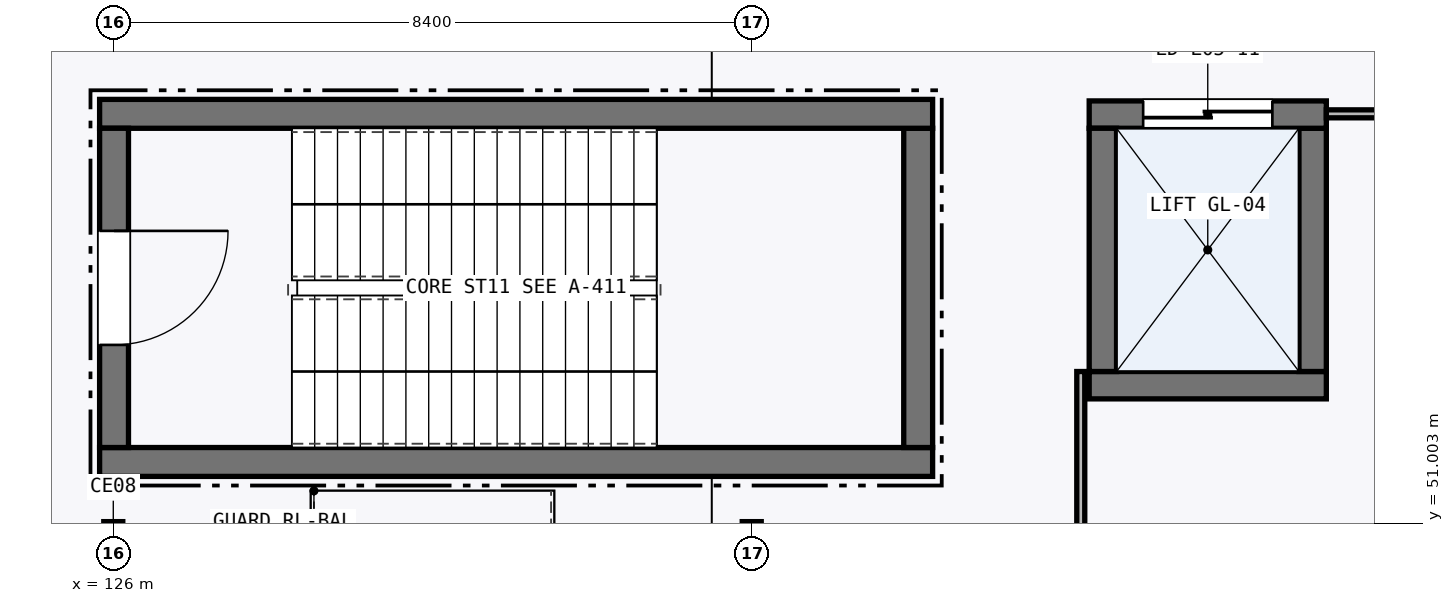
"""IFC4 building model, lengths in metres.
Left out: names, types, materials, properties, quantities, classifications, styles, units other than length and angle.
Written with IfcOpenShell. Run it as: python <this file> out.ifc"""

import sys

from ifc_helpers import new_model, si_unit, direction, frame, frame_2d, origin, origin_2d, place, context, subcontext, project, spatial, rectangle, i_section, extrude, element, fill, save


model = new_model("IFC4")
c1 = context("Model", 3, precision=1e-05, world=origin(), true_north=direction((0.0, 1.0)))
c2 = subcontext(c1, "Body", "Model", "MODEL_VIEW")
j1 = project(units=[si_unit("LENGTHUNIT", "METRE"), si_unit("PLANEANGLEUNIT", "RADIAN")], contexts=[c1])
p1 = place(None, origin())
s1 = spatial("IfcSite", under=j1, at=p1, CompositionType="ELEMENT")
p2 = place(p1, origin())
s2 = spatial("IfcBuilding", under=s1, at=p2, CompositionType="ELEMENT")
p3 = place(p2, frame((0.0, 0.0, 21.6)))
s3 = spatial("IfcBuildingStorey", under=s2, at=p3, CompositionType="ELEMENT", Elevation=21.6)
for number, where, z_axis, x_axis in (
    (1, (126.0, 50.9, 0.0), (0.0, 0.0, 1.0), (1.0, 0.0, 0.0)),
    (2, (134.4, 50.9, 0.0), (0.0, 0.0, 1.0), (1.0, 0.0, 0.0)),
):
    element("IfcColumn", number, at=place(p3, frame(where, z_axis=z_axis, x_axis=x_axis)), inside=s3, PredefinedType="COLUMN", context=c2, shape_type="SweptSolid", body=[
        extrude(i_section(OverallWidth=0.25, OverallDepth=0.25, WebThickness=0.009, FlangeThickness=0.014, FilletRadius=0.016, at=origin_2d()), origin(), (0.0, 0.0, 1.0), 5.1),
    ])
p4 = place(p3, frame((125.82, 51.81, 0.0), z_axis=(0.0, 0.0, 1.0), x_axis=(1.0, 0.0, 0.0)))
e3 = element("IfcWall", 3, at=p4, inside=s3, PredefinedType="SHEAR", context=c2, shape_type="SweptSolid", body=[
    extrude(rectangle(XDim=10.96, YDim=0.38, at=frame_2d((5.48, 0.0))), origin(), (0.0, 0.0, 1.0), 4.845),
])
p5 = place(p3, frame((136.59, 52.0, 0.0), z_axis=(0.0, 0.0, 1.0), x_axis=(0.0, 1.0, 0.0)))
e4 = element("IfcWall", 4, at=p5, inside=s3, PredefinedType="SHEAR", context=c2, shape_type="SweptSolid", body=[
    extrude(rectangle(XDim=4.2, YDim=0.38, at=frame_2d((2.1, 0.0))), origin(), (0.0, 0.0, 1.0), 4.845),
])
p6 = place(p3, frame((136.78, 56.39, 0.0), z_axis=(0.0, 0.0, 1.0), x_axis=(-1.0, 0.0, 0.0)))
e5 = element("IfcWall", 5, at=p6, inside=s3, PredefinedType="SHEAR", context=c2, shape_type="SweptSolid", body=[
    extrude(rectangle(XDim=10.96, YDim=0.38, at=frame_2d((5.48, 0.0))), origin(), (0.0, 0.0, 1.0), 4.845),
])
p7 = place(p3, frame((126.01, 56.2, 0.0), z_axis=(0.0, 0.0, 1.0), x_axis=(0.0, -1.0, 0.0)))
e6 = element("IfcWall", 6, at=p7, inside=s3, PredefinedType="SHEAR", context=c2, shape_type="SweptSolid", body=[
    extrude(rectangle(XDim=4.2, YDim=0.38, at=frame_2d((2.1, 0.0))), origin(), (0.0, 0.0, 1.0), 4.845),
])
p8 = place(p7, frame((1.35, 0.0, 0.0)))
e7 = element("IfcOpeningElement", 7, at=p8, cuts=e6, PredefinedType="OPENING", context=c2, shape_type="SweptSolid", body=[
    extrude(rectangle(XDim=1.5, YDim=2.15, at=frame_2d((0.75, 1.075))), frame((0.0, 0.2, 0.0), z_axis=(0.0, -1.0, 0.0), x_axis=(1.0, 0.0, 0.0)), (0.0, 0.0, 1.0), 0.4),
])
p9 = place(p3, frame((138.84, 52.82, 0.0), z_axis=(0.0, 0.0, 1.0), x_axis=(1.0, 0.0, 0.0)))
e8 = element("IfcWall", 8, at=p9, inside=s3, PredefinedType="SHEAR", context=c2, shape_type="SweptSolid", body=[
    extrude(rectangle(XDim=3.12, YDim=0.36, at=frame_2d((1.56, 0.0))), origin(), (0.0, 0.0, 1.0), 4.845),
])
p10 = place(p3, frame((141.78, 53.0, 0.0), z_axis=(0.0, 0.0, 1.0), x_axis=(0.0, 1.0, 0.0)))
e9 = element("IfcWall", 9, at=p10, inside=s3, PredefinedType="SHEAR", context=c2, shape_type="SweptSolid", body=[
    extrude(rectangle(XDim=3.2, YDim=0.36, at=frame_2d((1.6, 0.0))), origin(), (0.0, 0.0, 1.0), 4.845),
])
p11 = place(p3, frame((141.96, 56.38, 0.0), z_axis=(0.0, 0.0, 1.0), x_axis=(-1.0, 0.0, 0.0)))
e10 = element("IfcWall", 10, at=p11, inside=s3, PredefinedType="SHEAR", context=c2, shape_type="SweptSolid", body=[
    extrude(rectangle(XDim=3.12, YDim=0.36, at=frame_2d((1.56, 0.0))), origin(), (0.0, 0.0, 1.0), 4.845),
])
p12 = place(p11, frame((0.71, 0.0, 0.0)))
e11 = element("IfcOpeningElement", 11, at=p12, cuts=e10, PredefinedType="OPENING", context=c2, shape_type="SweptSolid", body=[
    extrude(rectangle(XDim=1.7, YDim=2.3, at=frame_2d((0.85, 1.15))), frame((0.0, 0.19, 0.0), z_axis=(0.0, -1.0, 0.0), x_axis=(1.0, 0.0, 0.0)), (0.0, 0.0, 1.0), 0.38),
])
p13 = place(p3, frame((139.02, 56.2, 0.0), z_axis=(0.0, 0.0, 1.0), x_axis=(0.0, -1.0, 0.0)))
e12 = element("IfcWall", 12, at=p13, inside=s3, PredefinedType="SHEAR", context=c2, shape_type="SweptSolid", body=[
    extrude(rectangle(XDim=3.2, YDim=0.36, at=frame_2d((1.6, 0.0))), origin(), (0.0, 0.0, 1.0), 4.845),
])
p14 = place(p3, frame((143.0, 56.39, 0.0), z_axis=(0.0, 0.0, 1.0), x_axis=(-1.0, 0.0, 0.0)))
e13 = element("IfcWall", 13, at=p14, inside=s3, PredefinedType="PARTITIONING", context=c2, shape_type="SweptSolid", body=[
    extrude(rectangle(XDim=1.04, YDim=0.105, at=frame_2d((0.52, 0.0))), origin(), (0.0, 0.0, 1.0), 4.845),
])
p15 = place(p3, frame((138.729, 53.0, 0.0), z_axis=(0.0, 0.0, 1.0), x_axis=(0.0, -1.0, 0.0)))
e14 = element("IfcWall", 14, at=p15, inside=s3, PredefinedType="PARTITIONING", context=c2, shape_type="SweptSolid", body=[
    extrude(rectangle(XDim=2.305, YDim=0.105, at=frame_2d((1.152, 0.0))), origin(), (0.0, 0.0, 1.0), 4.845),
])
p16 = place(p8, origin())
e15 = element("IfcDoor", 15, at=p16, inside=s3, OperationType="SINGLE_SWING_LEFT", PredefinedType="DOOR", context=c2, shape_type="SweptSolid", body=[
    extrude(rectangle(XDim=1.5, YDim=2.15, at=frame_2d((0.75, 1.075))), frame((0.0, 0.025, 0.0), z_axis=(0.0, -1.0, 0.0), x_axis=(1.0, 0.0, 0.0)), (0.0, 0.0, 1.0), 0.05),
])
fill(e7, e15)
p17 = place(p12, frame((1.7, 0.0, 0.0), z_axis=(0.0, 0.0, 1.0), x_axis=(-1.0, 0.0, 0.0)))
e16 = element("IfcDoor", 16, at=p17, inside=s3, OperationType="DOUBLE_DOOR_SLIDING", PredefinedType="DOOR", context=c2, shape_type="SweptSolid", body=[
    extrude(rectangle(XDim=1.7, YDim=2.3, at=frame_2d((0.85, 1.15))), frame((0.0, 0.025, 0.0), z_axis=(0.0, -1.0, 0.0), x_axis=(1.0, 0.0, 0.0)), (0.0, 0.0, 1.0), 0.05),
])
fill(e11, e16)
save(model, sys.argv[1])
